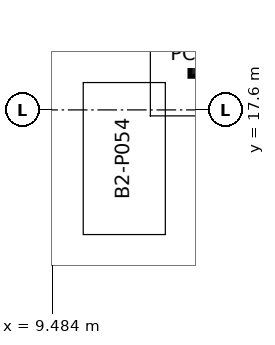
"""IFC4 building model, lengths in metres.
Left out: names, types, materials, properties, quantities, classifications, styles, units other than length and angle.
Written with IfcOpenShell. Run it as: python <this file> out.ifc"""

import sys

from ifc_helpers import new_model, si_unit, direction, frame, origin, origin_2d, place, context, subcontext, project, spatial, rectangle, extrude, element, save


model = new_model("IFC4")
c1 = context("Model", 3, precision=1e-05, world=origin(), true_north=direction((0.0, 1.0)))
c2 = subcontext(c1, "Body", "Model", "MODEL_VIEW")
j1 = project(units=[si_unit("LENGTHUNIT", "METRE"), si_unit("PLANEANGLEUNIT", "RADIAN")], contexts=[c1])
p1 = place(None, origin())
s1 = spatial("IfcSite", under=j1, at=p1, CompositionType="ELEMENT")
p2 = place(p1, origin())
s2 = spatial("IfcBuilding", under=s1, at=p2, CompositionType="ELEMENT")
p3 = place(p2, frame((0.0, 0.0, -9.0)))
s3 = spatial("IfcBuildingStorey", under=s2, at=p3, CompositionType="ELEMENT", Elevation=-9.0)
p4 = place(p3, frame((14.708, 19.404, 0.0), z_axis=(0.0, 0.0, 1.0), x_axis=(-0.555816910562, 0.8313047347, 0.0)))
e1 = element("IfcColumn", 1, at=p4, inside=s3, PredefinedType="COLUMN", context=c2, shape_type="SweptSolid", body=[
    extrude(rectangle(XDim=1.4, YDim=1.4, at=origin_2d()), origin(), (0.0, 0.0, 1.0), 4.5),
])
save(model, sys.argv[1])
